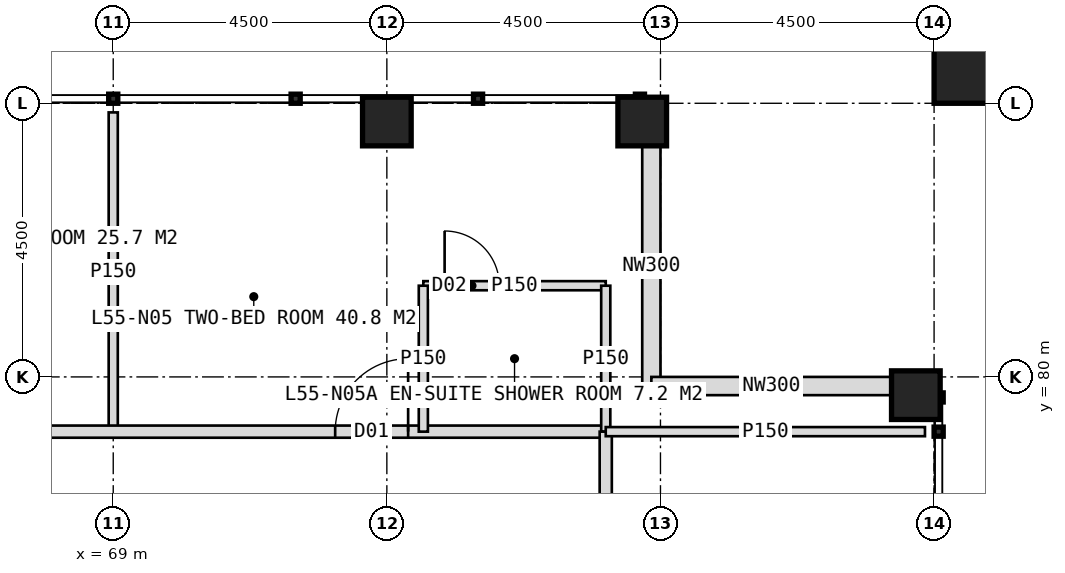
"""IFC4 building model, lengths in metres.
Left out: names, types, materials, properties, quantities, classifications, styles, units other than length and angle.
Written with IfcOpenShell. Run it as: python <this file> out.ifc"""

import sys

from ifc_helpers import new_model, si_unit, direction, frame, frame_2d, origin, origin_2d, place, context, subcontext, project, spatial, rectangle, hollow_rectangle, extrude, element, fill, save


model = new_model("IFC4")
c1 = context("Model", 3, precision=1e-05, world=origin(), true_north=direction((0.0, 1.0)))
c2 = subcontext(c1, "Body", "Model", "MODEL_VIEW")
j1 = project(units=[si_unit("LENGTHUNIT", "METRE"), si_unit("PLANEANGLEUNIT", "RADIAN")], contexts=[c1])
p1 = place(None, origin())
s1 = spatial("IfcSite", under=j1, at=p1, CompositionType="ELEMENT")
p2 = place(p1, origin())
s2 = spatial("IfcBuilding", under=s1, at=p2, CompositionType="ELEMENT")
p3 = place(p2, frame((0.0, 0.0, 229.0)))
s3 = spatial("IfcBuildingStorey", under=s2, at=p3, CompositionType="ELEMENT", Elevation=229.0)
for number, where, z_axis, x_axis in (
    (1, (73.5, 84.2, 0.0), (0.0, 0.0, 1.0), (1.0, 0.0, 0.0)),
    (2, (77.7, 84.2, 0.0), (0.0, 0.0, 1.0), (1.0, 0.0, 0.0)),
    (3, (82.2, 79.7, 0.0), (0.0, 0.0, 1.0), (1.0, 0.0, 0.0)),
):
    element("IfcColumn", number, at=place(p3, frame(where, z_axis=z_axis, x_axis=x_axis)), inside=s3, PredefinedType="COLUMN", context=c2, shape_type="SweptSolid", body=[
        extrude(hollow_rectangle(XDim=0.8, YDim=0.8, WallThickness=0.08, at=origin_2d()), origin(), (0.0, 0.0, 1.0), 4.0),
    ])
p4 = place(p3, frame((83.1, 85.1, 0.0), z_axis=(0.0, 0.0, 1.0), x_axis=(1.0, 0.0, 0.0)))
e4 = element("IfcColumn", 4, at=p4, inside=s3, PredefinedType="COLUMN", context=c2, shape_type="SweptSolid", body=[
    extrude(hollow_rectangle(XDim=1.2, YDim=1.2, WallThickness=0.07, at=origin_2d()), origin(), (0.0, 0.0, 1.0), 4.0),
])
for number, where, z_axis, x_axis in (
    (5, (77.85, 83.8, 0.0), (0.0, 0.0, 1.0), (0.0, -1.0, 0.0)),
    (6, (77.85, 79.85, 0.0), (0.0, 0.0, 1.0), (1.0, 0.0, 0.0)),
):
    element("IfcWall", number, at=place(p3, frame(where, z_axis=z_axis, x_axis=x_axis)), inside=s3, PredefinedType="ELEMENTEDWALL", context=c2, shape_type="SweptSolid", body=[
        extrude(rectangle(XDim=3.95, YDim=0.3, at=frame_2d((1.975, 0.0))), origin(), (0.0, 0.0, 1.0), 2.85),
    ])
p5 = place(p3, frame((69.0, 79.1, 0.0), z_axis=(0.0, 0.0, 1.0), x_axis=(0.0, 1.0, 0.0)))
e7 = element("IfcWall", 7, at=p5, inside=s3, PredefinedType="PARTITIONING", context=c2, shape_type="SweptSolid", body=[
    extrude(rectangle(XDim=5.25, YDim=0.15, at=frame_2d((2.625, 0.0))), origin(), (0.0, 0.0, 1.0), 3.75),
])
p6 = place(p3, frame((42.9, 79.1, 0.0), z_axis=(0.0, 0.0, 1.0), x_axis=(1.0, 0.0, 0.0)))
e8 = element("IfcWall", 8, at=p6, inside=s3, PredefinedType="PARTITIONING", context=c2, shape_type="SweptSolid", body=[
    extrude(rectangle(XDim=34.2, YDim=0.2, at=frame_2d((17.1, 0.0))), origin(), (0.0, 0.0, 1.0), 3.75),
])
p7 = place(p6, frame((3.55, 0.0, 0.0)))
e9 = element("IfcOpeningElement", 9, at=p7, cuts=e8, PredefinedType="OPENING", context=c2, shape_type="SweptSolid", body=[
    extrude(rectangle(XDim=1.0, YDim=2.1, at=frame_2d((0.5, 1.05))), frame((0.0, 0.11, 0.0), z_axis=(0.0, -1.0, 0.0), x_axis=(1.0, 0.0, 0.0)), (0.0, 0.0, 1.0), 0.22),
])
p8 = place(p6, frame((10.75, 0.0, 0.0)))
e10 = element("IfcOpeningElement", 10, at=p8, cuts=e8, PredefinedType="OPENING", context=c2, shape_type="SweptSolid", body=[
    extrude(rectangle(XDim=1.2, YDim=2.2, at=frame_2d((0.6, 1.1))), frame((0.0, 0.11, 0.0), z_axis=(0.0, -1.0, 0.0), x_axis=(1.0, 0.0, 0.0)), (0.0, 0.0, 1.0), 0.22),
])
p9 = place(p6, frame((16.25, 0.0, 0.0)))
e11 = element("IfcOpeningElement", 11, at=p9, cuts=e8, PredefinedType="OPENING", context=c2, shape_type="SweptSolid", body=[
    extrude(rectangle(XDim=1.2, YDim=2.2, at=frame_2d((0.6, 1.1))), frame((0.0, 0.11, 0.0), z_axis=(0.0, -1.0, 0.0), x_axis=(1.0, 0.0, 0.0)), (0.0, 0.0, 1.0), 0.22),
])
p10 = place(p6, frame((22.75, 0.0, 0.0)))
e12 = element("IfcOpeningElement", 12, at=p10, cuts=e8, PredefinedType="OPENING", context=c2, shape_type="SweptSolid", body=[
    extrude(rectangle(XDim=1.2, YDim=2.2, at=frame_2d((0.6, 1.1))), frame((0.0, 0.11, 0.0), z_axis=(0.0, -1.0, 0.0), x_axis=(1.0, 0.0, 0.0)), (0.0, 0.0, 1.0), 0.22),
])
p11 = place(p6, frame((29.75, 0.0, 0.0)))
e13 = element("IfcOpeningElement", 13, at=p11, cuts=e8, PredefinedType="OPENING", context=c2, shape_type="SweptSolid", body=[
    extrude(rectangle(XDim=1.2, YDim=2.2, at=frame_2d((0.6, 1.1))), frame((0.0, 0.11, 0.0), z_axis=(0.0, -1.0, 0.0), x_axis=(1.0, 0.0, 0.0)), (0.0, 0.0, 1.0), 0.22),
])
p12 = place(p3, frame((74.1, 81.5, 0.0), z_axis=(0.0, 0.0, 1.0), x_axis=(1.0, 0.0, 0.0)))
e14 = element("IfcWall", 14, at=p12, inside=s3, PredefinedType="PARTITIONING", context=c2, shape_type="SweptSolid", body=[
    extrude(rectangle(XDim=3.0, YDim=0.15, at=frame_2d((1.5, 0.0))), origin(), (0.0, 0.0, 1.0), 3.75),
])
p13 = place(p12, frame((0.35, 0.0, 0.0)))
e15 = element("IfcOpeningElement", 15, at=p13, cuts=e14, PredefinedType="OPENING", context=c2, shape_type="SweptSolid", body=[
    extrude(rectangle(XDim=0.9, YDim=2.1, at=frame_2d((0.45, 1.05))), frame((0.0, 0.085, 0.0), z_axis=(0.0, -1.0, 0.0), x_axis=(1.0, 0.0, 0.0)), (0.0, 0.0, 1.0), 0.17),
])
for number, where, z_axis, x_axis in (
    (16, (74.1, 79.1, 0.0), (0.0, 0.0, 1.0), (0.0, 1.0, 0.0)),
    (17, (77.1, 79.1, 0.0), (0.0, 0.0, 1.0), (0.0, 1.0, 0.0)),
):
    element("IfcWall", number, at=place(p3, frame(where, z_axis=z_axis, x_axis=x_axis)), inside=s3, PredefinedType="PARTITIONING", context=c2, shape_type="SweptSolid", body=[
        extrude(rectangle(XDim=2.4, YDim=0.15, at=frame_2d((1.2, 0.0))), origin(), (0.0, 0.0, 1.0), 3.75),
    ])
p14 = place(p3, frame((77.1, 79.1, 0.0), z_axis=(0.0, 0.0, 1.0), x_axis=(0.0, -1.0, 0.0)))
e18 = element("IfcWall", 18, at=p14, inside=s3, PredefinedType="PARTITIONING", context=c2, shape_type="SweptSolid", body=[
    extrude(rectangle(XDim=34.2, YDim=0.2, at=frame_2d((17.1, 0.0))), origin(), (0.0, 0.0, 1.0), 3.75),
])
p15 = place(p14, frame((3.65, 0.0, 0.0)))
e19 = element("IfcOpeningElement", 19, at=p15, cuts=e18, PredefinedType="OPENING", context=c2, shape_type="SweptSolid", body=[
    extrude(rectangle(XDim=1.2, YDim=2.2, at=frame_2d((0.6, 1.1))), frame((0.0, 0.11, 0.0), z_axis=(0.0, -1.0, 0.0), x_axis=(1.0, 0.0, 0.0)), (0.0, 0.0, 1.0), 0.22),
])
p16 = place(p14, frame((10.75, 0.0, 0.0)))
e20 = element("IfcOpeningElement", 20, at=p16, cuts=e18, PredefinedType="OPENING", context=c2, shape_type="SweptSolid", body=[
    extrude(rectangle(XDim=1.2, YDim=2.2, at=frame_2d((0.6, 1.1))), frame((0.0, 0.11, 0.0), z_axis=(0.0, -1.0, 0.0), x_axis=(1.0, 0.0, 0.0)), (0.0, 0.0, 1.0), 0.22),
])
p17 = place(p14, frame((15.1, 0.0, 0.0)))
e21 = element("IfcOpeningElement", 21, at=p17, cuts=e18, PredefinedType="OPENING", context=c2, shape_type="SweptSolid", body=[
    extrude(rectangle(XDim=1.0, YDim=2.1, at=frame_2d((0.5, 1.05))), frame((0.0, 0.11, 0.0), z_axis=(0.0, -1.0, 0.0), x_axis=(1.0, 0.0, 0.0)), (0.0, 0.0, 1.0), 0.22),
])
p18 = place(p14, frame((19.75, 0.0, 0.0)))
e22 = element("IfcOpeningElement", 22, at=p18, cuts=e18, PredefinedType="OPENING", context=c2, shape_type="SweptSolid", body=[
    extrude(rectangle(XDim=1.2, YDim=2.2, at=frame_2d((0.6, 1.1))), frame((0.0, 0.11, 0.0), z_axis=(0.0, -1.0, 0.0), x_axis=(1.0, 0.0, 0.0)), (0.0, 0.0, 1.0), 0.22),
])
p19 = place(p14, frame((30.35, 0.0, 0.0)))
e23 = element("IfcOpeningElement", 23, at=p19, cuts=e18, PredefinedType="OPENING", context=c2, shape_type="SweptSolid", body=[
    extrude(rectangle(XDim=1.2, YDim=2.2, at=frame_2d((0.6, 1.1))), frame((0.0, 0.11, 0.0), z_axis=(0.0, -1.0, 0.0), x_axis=(1.0, 0.0, 0.0)), (0.0, 0.0, 1.0), 0.22),
])
p20 = place(p3, frame((77.1, 79.1, 0.0), z_axis=(0.0, 0.0, 1.0), x_axis=(1.0, 0.0, 0.0)))
e24 = element("IfcWall", 24, at=p20, inside=s3, PredefinedType="PARTITIONING", context=c2, shape_type="SweptSolid", body=[
    extrude(rectangle(XDim=5.25, YDim=0.15, at=frame_2d((2.625, 0.0))), origin(), (0.0, 0.0, 1.0), 3.75),
])
p21 = place(p11, origin())
e25 = element("IfcDoor", 25, at=p21, inside=s3, OperationType="SINGLE_SWING_RIGHT", PredefinedType="DOOR", context=c2, shape_type="SweptSolid", body=[
    extrude(rectangle(XDim=1.2, YDim=2.2, at=frame_2d((0.6, 1.1))), frame((0.0, 0.025, 0.0), z_axis=(0.0, -1.0, 0.0), x_axis=(1.0, 0.0, 0.0)), (0.0, 0.0, 1.0), 0.05),
])
fill(e13, e25)
p22 = place(p13, origin())
e26 = element("IfcDoor", 26, at=p22, inside=s3, OperationType="SINGLE_SWING_LEFT", PredefinedType="DOOR", context=c2, shape_type="SweptSolid", body=[
    extrude(rectangle(XDim=0.9, YDim=2.1, at=frame_2d((0.45, 1.05))), frame((0.0, 0.025, 0.0), z_axis=(0.0, -1.0, 0.0), x_axis=(1.0, 0.0, 0.0)), (0.0, 0.0, 1.0), 0.05),
])
fill(e15, e26)
save(model, sys.argv[1])
